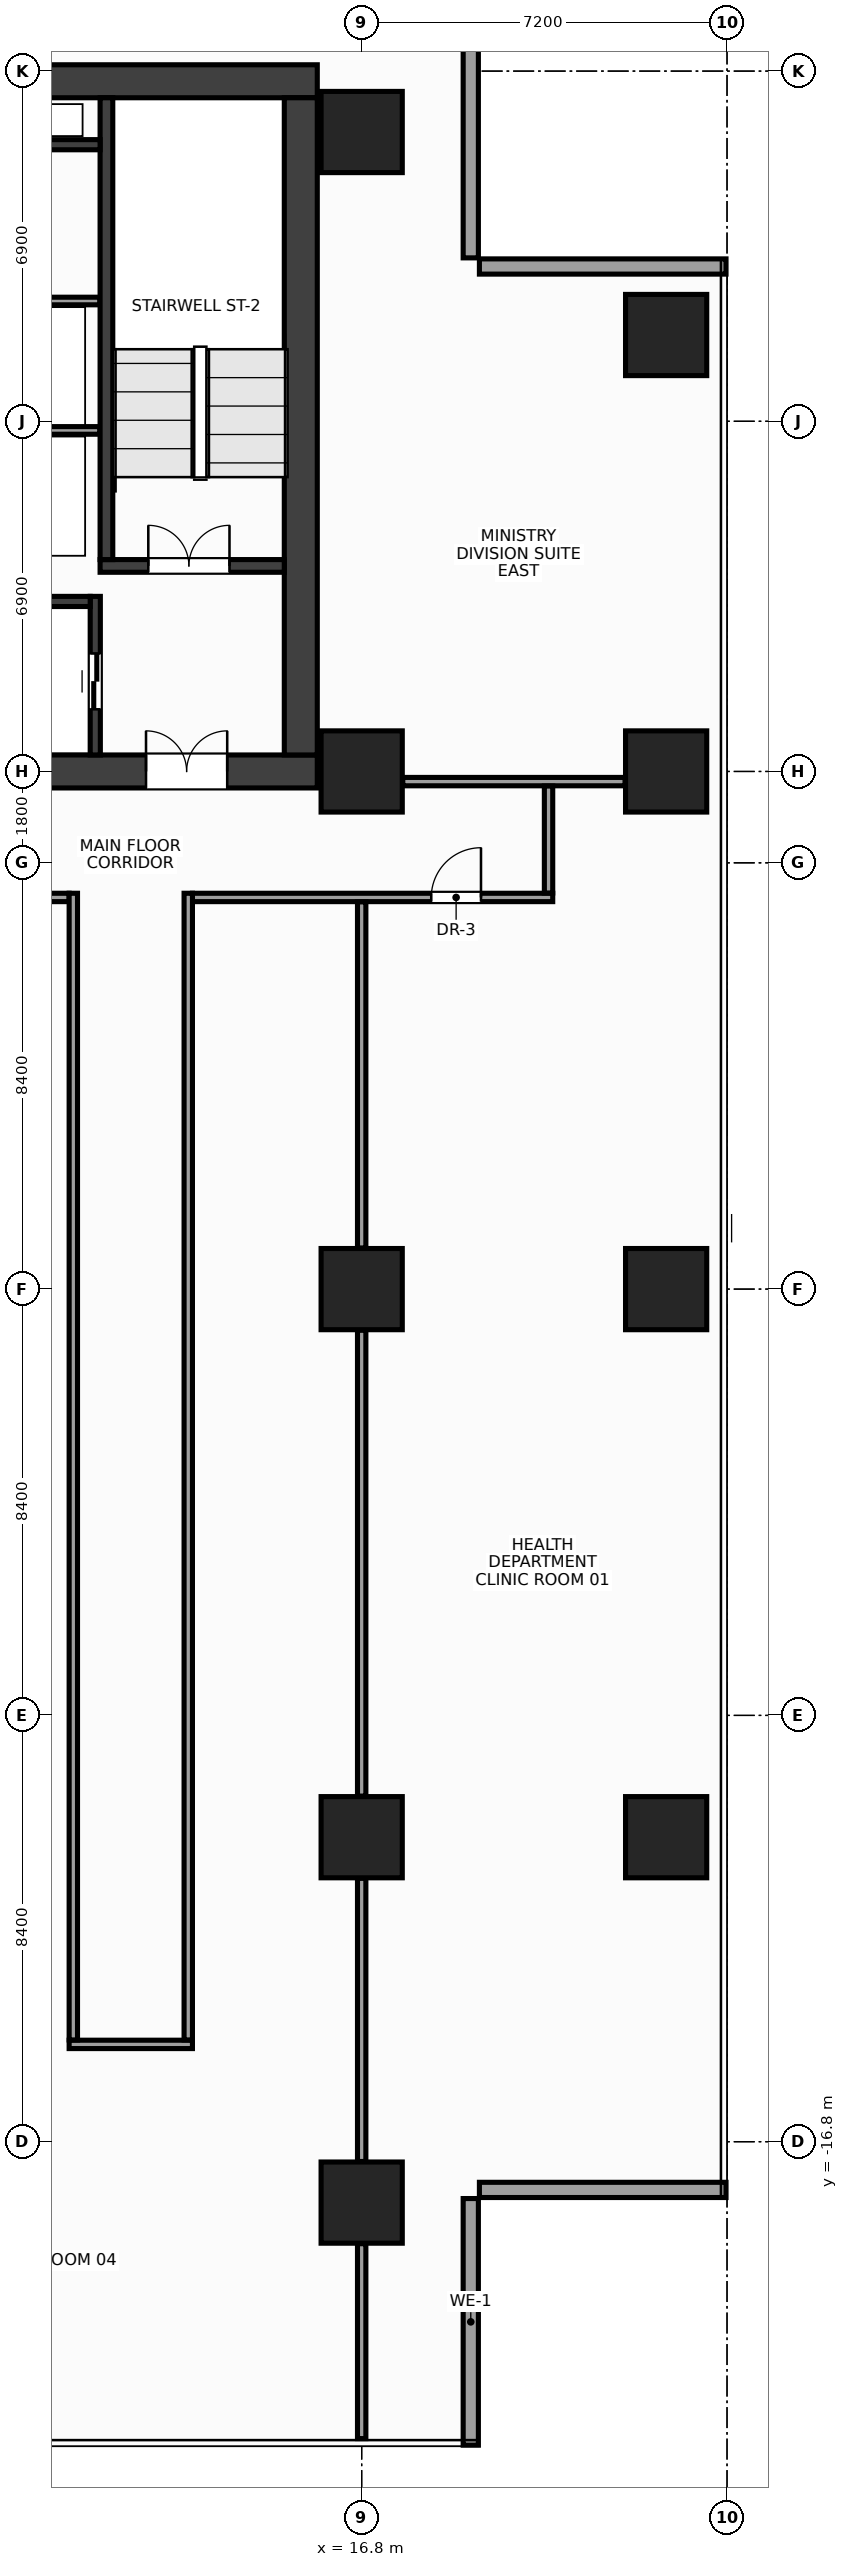
"""IFC4 building model, lengths in metres.
Left out: names, types, materials, properties, quantities, classifications, styles, units other than length and angle.
Written with IfcOpenShell. Run it as: python <this file> out.ifc"""

import sys

from ifc_helpers import new_model, si_unit, direction, frame, frame_2d, origin, origin_2d, place, context, subcontext, project, spatial, rectangle, extrude, source, transform, mapped, element, fill, save


model = new_model("IFC4")
c1 = context("Model", 3, precision=1e-05, world=origin(), true_north=direction((0.0, 1.0)))
c2 = subcontext(c1, "Body", "Model", "MODEL_VIEW")
j1 = project(units=[si_unit("LENGTHUNIT", "METRE"), si_unit("PLANEANGLEUNIT", "RADIAN")], contexts=[c1])
p1 = place(None, origin())
s1 = spatial("IfcSite", under=j1, at=p1, CompositionType="ELEMENT")
p2 = place(p1, origin())
s2 = spatial("IfcBuilding", under=s1, at=p2, CompositionType="ELEMENT")
p3 = place(p2, frame((0.0, 0.0, 164.0)))
s3 = spatial("IfcBuildingStorey", under=s2, at=p3, CompositionType="ELEMENT", Elevation=164.0)
m1 = source(origin(), c2, "Body", "SweptSolid", [
    extrude(rectangle(XDim=31.85, YDim=0.65, at=frame_2d((15.925, 0.0))), origin(), (0.0, 0.0, 1.0), 3.6),
])
p4 = place(p3, frame((-15.925, 23.8, 0.0), z_axis=(0.0, 0.0, 1.0), x_axis=(1.0, 0.0, 0.0)))
e1 = element("IfcWall", 1, at=p4, inside=s3, PredefinedType="SHEAR", context=c2, shape_type="MappedRepresentation", body=[
    mapped(m1, transform((0.0, 0.0, 0.0), x_axis=(1.0, 0.0, 0.0), y_axis=(0.0, 1.0, 0.0), z_axis=(0.0, 0.0, 1.0), scale=1.0)),
])
p5 = place(p3, frame((-15.925, 10.2, 0.0), z_axis=(0.0, 0.0, 1.0), x_axis=(1.0, 0.0, 0.0)))
e2 = element("IfcWall", 2, at=p5, inside=s3, PredefinedType="SHEAR", context=c2, shape_type="MappedRepresentation", body=[
    mapped(m1, transform((0.0, 0.0, 0.0), x_axis=(1.0, 0.0, 0.0), y_axis=(0.0, 1.0, 0.0), z_axis=(0.0, 0.0, 1.0), scale=1.0)),
])
p6 = place(p5, frame((1.775, 0.0, 0.0)))
e3 = element("IfcOpeningElement", 3, at=p6, cuts=e2, PredefinedType="OPENING", context=c2, shape_type="SweptSolid", body=[
    extrude(rectangle(XDim=1.6, YDim=2.15, at=frame_2d((0.8, 1.075))), frame((0.0, 0.337, 0.0), z_axis=(0.0, -1.0, 0.0), x_axis=(1.0, 0.0, 0.0)), (0.0, 0.0, 1.0), 0.674),
])
p7 = place(p5, frame((28.475, 0.0, 0.0)))
e4 = element("IfcOpeningElement", 4, at=p7, cuts=e2, PredefinedType="OPENING", context=c2, shape_type="SweptSolid", body=[
    extrude(rectangle(XDim=1.6, YDim=2.15, at=frame_2d((0.8, 1.075))), frame((0.0, 0.337, 0.0), z_axis=(0.0, -1.0, 0.0), x_axis=(1.0, 0.0, 0.0)), (0.0, 0.0, 1.0), 0.674),
])
p8 = place(p5, frame((15.175, 0.0, 0.0)))
e5 = element("IfcOpeningElement", 5, at=p8, cuts=e2, PredefinedType="OPENING", context=c2, shape_type="SweptSolid", body=[
    extrude(rectangle(XDim=1.5, YDim=2.2, at=frame_2d((0.75, 1.1))), frame((0.0, 0.337, 0.0), z_axis=(0.0, -1.0, 0.0), x_axis=(1.0, 0.0, 0.0)), (0.0, 0.0, 1.0), 0.674),
])
m2 = source(origin(), c2, "Body", "SweptSolid", [
    extrude(rectangle(XDim=12.95, YDim=0.65, at=frame_2d((6.475, 0.0))), origin(), (0.0, 0.0, 1.0), 3.6),
])
p9 = place(p3, frame((15.6, 10.525, 0.0), z_axis=(0.0, 0.0, 1.0), x_axis=(0.0, 1.0, 0.0)))
e6 = element("IfcWall", 6, at=p9, inside=s3, PredefinedType="SHEAR", context=c2, shape_type="MappedRepresentation", body=[
    mapped(m2, transform((0.0, 0.0, 0.0), x_axis=(1.0, 0.0, 0.0), y_axis=(0.0, 1.0, 0.0), z_axis=(0.0, 0.0, 1.0), scale=1.0)),
])
m3 = source(origin(), c2, "Body", "SweptSolid", [
    extrude(rectangle(XDim=3.63, YDim=0.25, at=frame_2d((1.815, 0.0))), origin(), (0.0, 0.0, 1.0), 3.6),
])
p10 = place(p3, frame((11.645, 14.25, 0.0), z_axis=(0.0, 0.0, 1.0), x_axis=(1.0, 0.0, 0.0)))
e7 = element("IfcWall", 7, at=p10, inside=s3, PredefinedType="SHEAR", context=c2, shape_type="MappedRepresentation", body=[
    mapped(m3, transform((0.0, 0.0, 0.0), x_axis=(1.0, 0.0, 0.0), y_axis=(0.0, 1.0, 0.0), z_axis=(0.0, 0.0, 1.0), scale=1.0)),
])
p11 = place(p10, frame((0.95, 0.0, 0.0)))
e8 = element("IfcOpeningElement", 8, at=p11, cuts=e7, PredefinedType="OPENING", context=c2, shape_type="SweptSolid", body=[
    extrude(rectangle(XDim=1.6, YDim=2.15, at=frame_2d((0.8, 1.075))), frame((0.0, 0.137, 0.0), z_axis=(0.0, -1.0, 0.0), x_axis=(1.0, 0.0, 0.0)), (0.0, 0.0, 1.0), 0.274),
])
m4 = source(origin(), c2, "Body", "SweptSolid", [
    extrude(rectangle(XDim=9.1, YDim=0.25, at=frame_2d((4.55, 0.0))), origin(), (0.0, 0.0, 1.0), 3.6),
])
p12 = place(p3, frame((11.77, 14.375, 0.0), z_axis=(0.0, 0.0, 1.0), x_axis=(0.0, 1.0, 0.0)))
e9 = element("IfcWall", 9, at=p12, inside=s3, PredefinedType="SHEAR", context=c2, shape_type="MappedRepresentation", body=[
    mapped(m4, transform((0.0, 0.0, 0.0), x_axis=(1.0, 0.0, 0.0), y_axis=(0.0, 1.0, 0.0), z_axis=(0.0, 0.0, 1.0), scale=1.0)),
])
m5 = source(origin(), c2, "Body", "SweptSolid", [
    extrude(rectangle(XDim=3.125, YDim=0.2, at=frame_2d((1.562, 0.0))), origin(), (0.0, 0.0, 1.0), 3.6),
])
p13 = place(p3, frame((11.55, 10.525, 0.0), z_axis=(0.0, 0.0, 1.0), x_axis=(0.0, 1.0, 0.0)))
e10 = element("IfcWall", 10, at=p13, inside=s3, PredefinedType="SHEAR", context=c2, shape_type="MappedRepresentation", body=[
    mapped(m5, transform((0.0, 0.0, 0.0), x_axis=(1.0, 0.0, 0.0), y_axis=(0.0, 1.0, 0.0), z_axis=(0.0, 0.0, 1.0), scale=1.0)),
])
p14 = place(p13, frame((0.9, 0.0, 0.0)))
e11 = element("IfcOpeningElement", 11, at=p14, cuts=e10, PredefinedType="OPENING", context=c2, shape_type="SweptSolid", body=[
    extrude(rectangle(XDim=1.1, YDim=2.15, at=frame_2d((0.55, 1.075))), frame((0.0, 0.112, 0.0), z_axis=(0.0, -1.0, 0.0), x_axis=(1.0, 0.0, 0.0)), (0.0, 0.0, 1.0), 0.224),
])
m6 = source(origin(), c2, "Body", "SweptSolid", [
    extrude(rectangle(XDim=2.825, YDim=0.2, at=frame_2d((1.413, 0.0))), origin(), (0.0, 0.0, 1.0), 3.6),
])
p15 = place(p3, frame((8.625, 13.55, 0.0), z_axis=(0.0, 0.0, 1.0), x_axis=(1.0, 0.0, 0.0)))
e12 = element("IfcWall", 12, at=p15, inside=s3, PredefinedType="SHEAR", context=c2, shape_type="MappedRepresentation", body=[
    mapped(m6, transform((0.0, 0.0, 0.0), x_axis=(1.0, 0.0, 0.0), y_axis=(0.0, 1.0, 0.0), z_axis=(0.0, 0.0, 1.0), scale=1.0)),
])
m7 = source(origin(), c2, "Body", "SweptSolid", [
    extrude(rectangle(XDim=3.02, YDim=0.2, at=frame_2d((1.51, 0.0))), origin(), (0.0, 0.0, 1.0), 3.6),
])
p16 = place(p3, frame((8.625, 22.55, 0.0), z_axis=(0.0, 0.0, 1.0), x_axis=(1.0, 0.0, 0.0)))
e13 = element("IfcWall", 13, at=p16, inside=s3, PredefinedType="SHEAR", context=c2, shape_type="MappedRepresentation", body=[
    mapped(m7, transform((0.0, 0.0, 0.0), x_axis=(1.0, 0.0, 0.0), y_axis=(0.0, 1.0, 0.0), z_axis=(0.0, 0.0, 1.0), scale=1.0)),
])
m8 = source(origin(), c2, "Body", "SweptSolid", [
    extrude(rectangle(XDim=1.6, YDim=1.6, at=origin_2d()), origin(), (0.0, 0.0, 1.0), 3.6),
])
for number, where, z_axis, x_axis in (
    (14, (16.8, -18.0, 0.0), (0.0, 0.0, 1.0), (1.0, 0.0, 0.0)),
    (15, (16.8, -10.8, 0.0), (0.0, 0.0, 1.0), (1.0, 0.0, 0.0)),
    (16, (16.8, 0.0, 0.0), (0.0, 0.0, 1.0), (1.0, 0.0, 0.0)),
    (17, (16.8, 10.2, 0.0), (0.0, 0.0, 1.0), (1.0, 0.0, 0.0)),
    (18, (16.8, 22.8, 0.0), (0.0, 0.0, 1.0), (1.0, 0.0, 0.0)),
    (19, (22.8, -10.8, 0.0), (0.0, 0.0, 1.0), (1.0, 0.0, 0.0)),
    (20, (22.8, 0.0, 0.0), (0.0, 0.0, 1.0), (1.0, 0.0, 0.0)),
    (21, (22.8, 10.2, 0.0), (0.0, 0.0, 1.0), (1.0, 0.0, 0.0)),
    (22, (22.8, 18.8, 0.0), (0.0, 0.0, 1.0), (1.0, 0.0, 0.0)),
):
    element("IfcColumn", number, at=place(p3, frame(where, z_axis=z_axis, x_axis=x_axis)), inside=s3, PredefinedType="COLUMN", context=c2, shape_type="MappedRepresentation", body=[
        mapped(m8, transform((0.0, 0.0, 0.0), x_axis=(1.0, 0.0, 0.0), y_axis=(0.0, 1.0, 0.0), z_axis=(0.0, 0.0, 1.0), scale=1.0)),
    ])
m9 = source(origin(), c2, "Body", "SweptSolid", [
    extrude(rectangle(XDim=4.86, YDim=0.3, at=frame_2d((2.43, 0.0))), origin(), (0.0, 0.0, 1.0), 2.76),
])
p17 = place(p3, frame((18.95, -22.78, 0.0), z_axis=(0.0, 0.0, 1.0), x_axis=(0.0, 1.0, 0.0)))
e23 = element("IfcWall", 23, at=p17, inside=s3, PredefinedType="STANDARD", context=c2, shape_type="MappedRepresentation", body=[
    mapped(m9, transform((0.0, 0.0, 0.0), x_axis=(1.0, 0.0, 0.0), y_axis=(0.0, 1.0, 0.0), z_axis=(0.0, 0.0, 1.0), scale=1.0)),
])
m10 = source(origin(), c2, "Body", "SweptSolid", [
    extrude(rectangle(XDim=4.86, YDim=0.3, at=frame_2d((2.43, 0.0))), origin(), (0.0, 0.0, 1.0), 2.76),
])
for number, where, z_axis, x_axis in (
    (24, (19.12, -17.75, 0.0), (0.0, 0.0, 1.0), (1.0, 0.0, 0.0)),
    (25, (23.98, 20.15, 0.0), (0.0, 0.0, 1.0), (-1.0, 0.0, 0.0)),
    (26, (18.95, 20.32, 0.0), (0.0, 0.0, 1.0), (0.0, 1.0, 0.0)),
):
    element("IfcWall", number, at=place(p3, frame(where, z_axis=z_axis, x_axis=x_axis)), inside=s3, PredefinedType="STANDARD", context=c2, shape_type="MappedRepresentation", body=[
        mapped(m10, transform((0.0, 0.0, 0.0), x_axis=(1.0, 0.0, 0.0), y_axis=(0.0, 1.0, 0.0), z_axis=(0.0, 0.0, 1.0), scale=1.0)),
    ])
m11 = source(origin(), c2, "Body", "SweptSolid", [
    extrude(rectangle(XDim=3.01, YDim=0.15, at=frame_2d((1.505, 0.0))), origin(), (0.0, 0.0, 1.0), 3.38),
])
for number, where, z_axis, x_axis in (
    (27, (8.63, 16.92, 0.0), (0.0, 0.0, 1.0), (1.0, 0.0, 0.0)),
    (28, (8.63, 19.47, 0.0), (0.0, 0.0, 1.0), (1.0, 0.0, 0.0)),
):
    element("IfcWall", number, at=place(p3, frame(where, z_axis=z_axis, x_axis=x_axis)), inside=s3, PredefinedType="PARTITIONING", context=c2, shape_type="MappedRepresentation", body=[
        mapped(m11, transform((0.0, 0.0, 0.0), x_axis=(1.0, 0.0, 0.0), y_axis=(0.0, 1.0, 0.0), z_axis=(0.0, 0.0, 1.0), scale=1.0)),
    ])
m12 = source(origin(), c2, "Body", "SweptSolid", [
    extrude(rectangle(XDim=4.38, YDim=0.165, at=frame_2d((2.19, 0.0))), origin(), (0.0, 0.0, 1.0), 2.915),
])
p18 = place(p3, frame((17.61, 10.0, 0.0), z_axis=(0.0, 0.0, 1.0), x_axis=(1.0, 0.0, 0.0)))
e29 = element("IfcWall", 29, at=p18, inside=s3, PredefinedType="PARTITIONING", context=c2, shape_type="MappedRepresentation", body=[
    mapped(m12, transform((0.0, 0.0, 0.0), x_axis=(1.0, 0.0, 0.0), y_axis=(0.0, 1.0, 0.0), z_axis=(0.0, 0.0, 1.0), scale=1.0)),
])
m13 = source(origin(), c2, "Body", "SweptSolid", [
    extrude(rectangle(XDim=31.6, YDim=0.165, at=frame_2d((15.8, 0.0))), origin(), (0.0, 0.0, 1.0), 2.765),
])
p19 = place(p3, frame((-20.565, 7.718, 0.0), z_axis=(0.0, 0.0, 1.0), x_axis=(1.0, 0.0, 0.0)))
e30 = element("IfcWall", 30, at=p19, inside=s3, PredefinedType="PARTITIONING", context=c2, shape_type="MappedRepresentation", body=[
    mapped(m13, transform((0.0, 0.0, 0.0), x_axis=(1.0, 0.0, 0.0), y_axis=(0.0, 1.0, 0.0), z_axis=(0.0, 0.0, 1.0), scale=1.0)),
])
p20 = place(p19, frame((2.614, 0.0, 0.0)))
e31 = element("IfcOpeningElement", 31, at=p20, cuts=e30, PredefinedType="OPENING", context=c2, shape_type="SweptSolid", body=[
    extrude(rectangle(XDim=0.98, YDim=2.15, at=frame_2d((0.49, 1.075))), frame((0.0, 0.094, 0.0), z_axis=(0.0, -1.0, 0.0), x_axis=(1.0, 0.0, 0.0)), (0.0, 0.0, 1.0), 0.189),
])
p21 = place(p19, frame((15.175, 0.0, 0.0)))
e32 = element("IfcOpeningElement", 32, at=p21, cuts=e30, PredefinedType="OPENING", context=c2, shape_type="SweptSolid", body=[
    extrude(rectangle(XDim=0.98, YDim=2.15, at=frame_2d((0.49, 1.075))), frame((0.0, 0.094, 0.0), z_axis=(0.0, -1.0, 0.0), x_axis=(1.0, 0.0, 0.0)), (0.0, 0.0, 1.0), 0.189),
])
p22 = place(p19, frame((27.874, 0.0, 0.0)))
e33 = element("IfcOpeningElement", 33, at=p22, cuts=e30, PredefinedType="OPENING", context=c2, shape_type="SweptSolid", body=[
    extrude(rectangle(XDim=0.98, YDim=2.15, at=frame_2d((0.49, 1.075))), frame((0.0, 0.094, 0.0), z_axis=(0.0, -1.0, 0.0), x_axis=(1.0, 0.0, 0.0)), (0.0, 0.0, 1.0), 0.189),
])
m14 = source(origin(), c2, "Body", "SweptSolid", [
    extrude(rectangle(XDim=7.1, YDim=0.165, at=frame_2d((3.55, 0.0))), origin(), (0.0, 0.0, 1.0), 2.765),
])
p23 = place(p3, frame((13.465, 7.718, 0.0), z_axis=(0.0, 0.0, 1.0), x_axis=(1.0, 0.0, 0.0)))
e34 = element("IfcWall", 34, at=p23, inside=s3, PredefinedType="PARTITIONING", context=c2, shape_type="MappedRepresentation", body=[
    mapped(m14, transform((0.0, 0.0, 0.0), x_axis=(1.0, 0.0, 0.0), y_axis=(0.0, 1.0, 0.0), z_axis=(0.0, 0.0, 1.0), scale=1.0)),
])
p24 = place(p23, frame((4.706, 0.0, 0.0)))
e35 = element("IfcOpeningElement", 35, at=p24, cuts=e34, PredefinedType="OPENING", context=c2, shape_type="SweptSolid", body=[
    extrude(rectangle(XDim=0.98, YDim=2.15, at=frame_2d((0.49, 1.075))), frame((0.0, 0.094, 0.0), z_axis=(0.0, -1.0, 0.0), x_axis=(1.0, 0.0, 0.0)), (0.0, 0.0, 1.0), 0.189),
])
m15 = source(origin(), c2, "Body", "SweptSolid", [
    extrude(rectangle(XDim=2.43, YDim=0.165, at=frame_2d((1.215, 0.0))), origin(), (0.0, 0.0, 1.0), 3.38),
])
p25 = place(p3, frame((11.035, -14.883, 0.0), z_axis=(0.0, 0.0, 1.0), x_axis=(1.0, 0.0, 0.0)))
e36 = element("IfcWall", 36, at=p25, inside=s3, PredefinedType="PARTITIONING", context=c2, shape_type="MappedRepresentation", body=[
    mapped(m15, transform((0.0, 0.0, 0.0), x_axis=(1.0, 0.0, 0.0), y_axis=(0.0, 1.0, 0.0), z_axis=(0.0, 0.0, 1.0), scale=1.0)),
])
m16 = source(origin(), c2, "Body", "SweptSolid", [
    extrude(rectangle(XDim=2.108, YDim=0.165, at=frame_2d((1.054, 0.0))), origin(), (0.0, 0.0, 1.0), 3.38),
])
p26 = place(p3, frame((20.482, 7.805, 0.0), z_axis=(0.0, 0.0, 1.0), x_axis=(0.0, 1.0, 0.0)))
e37 = element("IfcWall", 37, at=p26, inside=s3, PredefinedType="PARTITIONING", context=c2, shape_type="MappedRepresentation", body=[
    mapped(m16, transform((0.0, 0.0, 0.0), x_axis=(1.0, 0.0, 0.0), y_axis=(0.0, 1.0, 0.0), z_axis=(0.0, 0.0, 1.0), scale=1.0)),
])
m17 = source(origin(), c2, "Body", "SweptSolid", [
    extrude(rectangle(XDim=22.595, YDim=0.165, at=frame_2d((11.297, 0.0))), origin(), (0.0, 0.0, 1.0), 2.665),
])
for number, where, z_axis, x_axis in (
    (38, (11.117, -14.795, 0.0), (0.0, 0.0, 1.0), (0.0, 1.0, 0.0)),
    (39, (13.383, -14.795, 0.0), (0.0, 0.0, 1.0), (0.0, 1.0, 0.0)),
):
    element("IfcWall", number, at=place(p3, frame(where, z_axis=z_axis, x_axis=x_axis)), inside=s3, PredefinedType="PARTITIONING", context=c2, shape_type="MappedRepresentation", body=[
        mapped(m17, transform((0.0, 0.0, 0.0), x_axis=(1.0, 0.0, 0.0), y_axis=(0.0, 1.0, 0.0), z_axis=(0.0, 0.0, 1.0), scale=1.0)),
    ])
m18 = source(origin(), c2, "Body", "SweptSolid", [
    extrude(rectangle(XDim=3.84, YDim=0.165, at=frame_2d((1.92, 0.0))), origin(), (0.0, 0.0, 1.0), 3.38),
])
p27 = place(p3, frame((16.8, -22.65, 0.0), z_axis=(0.0, 0.0, 1.0), x_axis=(0.0, 1.0, 0.0)))
e40 = element("IfcWall", 40, at=p27, inside=s3, PredefinedType="PARTITIONING", context=c2, shape_type="MappedRepresentation", body=[
    mapped(m18, transform((0.0, 0.0, 0.0), x_axis=(1.0, 0.0, 0.0), y_axis=(0.0, 1.0, 0.0), z_axis=(0.0, 0.0, 1.0), scale=1.0)),
])
m19 = source(origin(), c2, "Body", "SweptSolid", [
    extrude(rectangle(XDim=5.58, YDim=0.165, at=frame_2d((2.79, 0.0))), origin(), (0.0, 0.0, 1.0), 2.965),
])
p28 = place(p3, frame((16.8, -17.19, 0.0), z_axis=(0.0, 0.0, 1.0), x_axis=(0.0, 1.0, 0.0)))
e41 = element("IfcWall", 41, at=p28, inside=s3, PredefinedType="PARTITIONING", context=c2, shape_type="MappedRepresentation", body=[
    mapped(m19, transform((0.0, 0.0, 0.0), x_axis=(1.0, 0.0, 0.0), y_axis=(0.0, 1.0, 0.0), z_axis=(0.0, 0.0, 1.0), scale=1.0)),
])
m20 = source(origin(), c2, "Body", "SweptSolid", [
    extrude(rectangle(XDim=9.18, YDim=0.165, at=frame_2d((4.59, 0.0))), origin(), (0.0, 0.0, 1.0), 2.765),
])
p29 = place(p3, frame((16.8, -9.99, 0.0), z_axis=(0.0, 0.0, 1.0), x_axis=(0.0, 1.0, 0.0)))
e42 = element("IfcWall", 42, at=p29, inside=s3, PredefinedType="PARTITIONING", context=c2, shape_type="MappedRepresentation", body=[
    mapped(m20, transform((0.0, 0.0, 0.0), x_axis=(1.0, 0.0, 0.0), y_axis=(0.0, 1.0, 0.0), z_axis=(0.0, 0.0, 1.0), scale=1.0)),
])
m21 = source(origin(), c2, "Body", "SweptSolid", [
    extrude(rectangle(XDim=6.82, YDim=0.165, at=frame_2d((3.41, 0.0))), origin(), (0.0, 0.0, 1.0), 2.765),
])
p30 = place(p3, frame((16.8, 0.81, 0.0), z_axis=(0.0, 0.0, 1.0), x_axis=(0.0, 1.0, 0.0)))
e43 = element("IfcWall", 43, at=p30, inside=s3, PredefinedType="PARTITIONING", context=c2, shape_type="MappedRepresentation", body=[
    mapped(m21, transform((0.0, 0.0, 0.0), x_axis=(1.0, 0.0, 0.0), y_axis=(0.0, 1.0, 0.0), z_axis=(0.0, 0.0, 1.0), scale=1.0)),
])
m22 = source(origin(), c2, "Body", "SweptSolid", [
    extrude(rectangle(XDim=1.6, YDim=2.15, at=frame_2d((0.8, 1.075))), frame((0.0, 0.025, 0.0), z_axis=(0.0, -1.0, 0.0), x_axis=(1.0, 0.0, 0.0)), (0.0, 0.0, 1.0), 0.05),
])
p31 = place(p11, origin())
e44 = element("IfcDoor", 44, at=p31, inside=s3, OperationType="DOUBLE_DOOR_SINGLE_SWING", PredefinedType="DOOR", context=c2, shape_type="MappedRepresentation", body=[
    mapped(m22, transform((0.0, 0.0, 0.0), x_axis=(1.0, 0.0, 0.0), y_axis=(0.0, 1.0, 0.0), z_axis=(0.0, 0.0, 1.0), scale=1.0)),
])
fill(e8, e44)
p32 = place(p7, origin())
e45 = element("IfcDoor", 45, at=p32, inside=s3, OperationType="DOUBLE_DOOR_SINGLE_SWING", PredefinedType="DOOR", context=c2, shape_type="MappedRepresentation", body=[
    mapped(m22, transform((0.0, 0.0, 0.0), x_axis=(1.0, 0.0, 0.0), y_axis=(0.0, 1.0, 0.0), z_axis=(0.0, 0.0, 1.0), scale=1.0)),
])
fill(e4, e45)
m23 = source(origin(), c2, "Body", "SweptSolid", [
    extrude(rectangle(XDim=1.1, YDim=2.15, at=frame_2d((0.55, 1.075))), frame((0.0, 0.025, 0.0), z_axis=(0.0, -1.0, 0.0), x_axis=(1.0, 0.0, 0.0)), (0.0, 0.0, 1.0), 0.05),
])
p33 = place(p14, origin())
e46 = element("IfcDoor", 46, at=p33, inside=s3, OperationType="DOUBLE_DOOR_SLIDING", PredefinedType="DOOR", context=c2, shape_type="MappedRepresentation", body=[
    mapped(m23, transform((0.0, 0.0, 0.0), x_axis=(1.0, 0.0, 0.0), y_axis=(0.0, 1.0, 0.0), z_axis=(0.0, 0.0, 1.0), scale=1.0)),
])
fill(e11, e46)
m24 = source(origin(), c2, "Body", "SweptSolid", [
    extrude(rectangle(XDim=0.98, YDim=2.15, at=frame_2d((0.49, 1.075))), frame((0.0, 0.025, 0.0), z_axis=(0.0, -1.0, 0.0), x_axis=(1.0, 0.0, 0.0)), (0.0, 0.0, 1.0), 0.05),
])
p34 = place(p24, origin())
e47 = element("IfcDoor", 47, at=p34, inside=s3, OperationType="SINGLE_SWING_RIGHT", PredefinedType="DOOR", context=c2, shape_type="MappedRepresentation", body=[
    mapped(m24, transform((0.0, 0.0, 0.0), x_axis=(1.0, 0.0, 0.0), y_axis=(0.0, 1.0, 0.0), z_axis=(0.0, 0.0, 1.0), scale=1.0)),
])
fill(e35, e47)
save(model, sys.argv[1])
